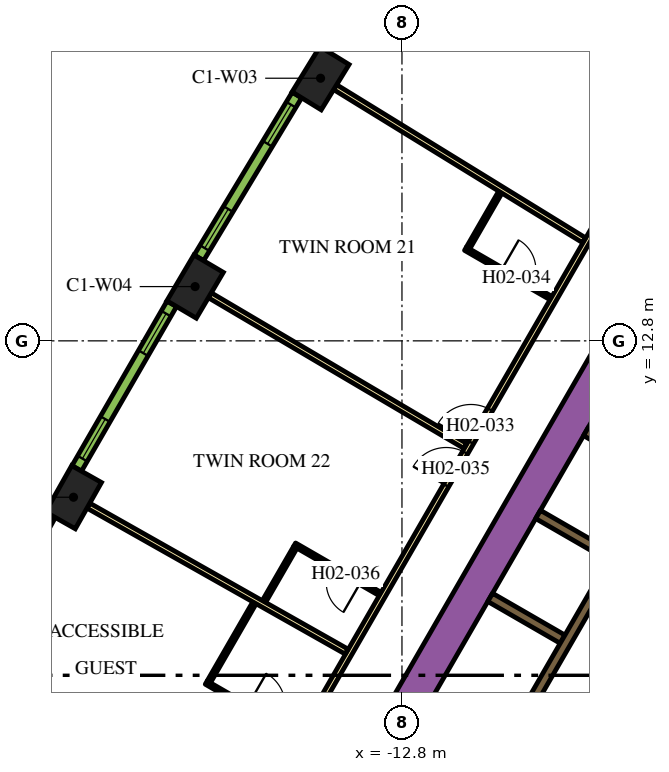
"""IFC4 building model, lengths in metres.
Left out: names, types, materials, properties, quantities, classifications, styles, units other than length and angle.
Written with IfcOpenShell. Run it as: python <this file> out.ifc"""

import sys

from ifc_helpers import new_model, si_unit, direction, frame, frame_2d, origin, origin_2d, place, context, subcontext, project, spatial, rectangle, extrude, element, fill, save


model = new_model("IFC4")
c1 = context("Model", 3, precision=1e-05, world=origin(), true_north=direction((0.0, 1.0)))
c2 = subcontext(c1, "Body", "Model", "MODEL_VIEW")
j1 = project(units=[si_unit("LENGTHUNIT", "METRE"), si_unit("PLANEANGLEUNIT", "RADIAN")], contexts=[c1])
p1 = place(None, origin())
s1 = spatial("IfcSite", under=j1, at=p1, CompositionType="ELEMENT")
p2 = place(p1, origin())
s2 = spatial("IfcBuilding", under=s1, at=p2, CompositionType="ELEMENT")
p3 = place(p2, frame((0.0, 0.0, 39.3)))
s3 = spatial("IfcBuildingStorey", under=s2, at=p3, CompositionType="ELEMENT", Elevation=39.3)
for number, where, z_axis, x_axis in (
    (1, (-14.942, 19.71, 0.0), (0.0, 0.0, 1.0), (-0.524, -0.852, 0.0)),
    (2, (-18.243, 14.228, 0.0), (0.0, 0.0, 1.0), (-0.508, -0.861, 0.0)),
    (3, (-21.443, 8.685, 0.0), (0.0, 0.0, 1.0), (-0.492, -0.871, 0.0)),
):
    element("IfcColumn", number, at=place(p3, frame(where, z_axis=z_axis, x_axis=x_axis)), inside=s3, PredefinedType="COLUMN", context=c2, shape_type="SweptSolid", body=[
        extrude(rectangle(XDim=1.4, YDim=0.9, at=origin_2d()), origin(), (0.0, 0.0, 1.0), 3.9),
    ])
p4 = place(p3, frame((-15.36, -1.503, 0.0), z_axis=(0.0, 0.0, 1.0), x_axis=(0.50000389221, 0.866023156604, 0.0)))
e4 = element("IfcWall", 4, at=p4, inside=s3, PredefinedType="SOLIDWALL", context=c2, shape_type="SweptSolid", body=[
    extrude(rectangle(XDim=21.0, YDim=0.9, at=frame_2d((10.5, 0.0))), origin(), (0.0, 0.0, 1.0), 3.9),
])
p5 = place(p3, frame((-8.06, -1.311, 0.0), z_axis=(0.0, 0.0, 1.0), x_axis=(0.50000273126, 0.866023826885, 0.0)))
e5 = element("IfcWall", 5, at=p5, inside=s3, PredefinedType="SOLIDWALL", context=c2, shape_type="SweptSolid", body=[
    extrude(rectangle(XDim=10.33, YDim=0.25, at=frame_2d((5.165, 0.0))), origin(), (0.0, 0.0, 1.0), 3.9),
])
for number, where, z_axis, x_axis in (
    (6, (-8.574, 4.95, 0.0), (0.0, 0.0, 1.0), (-0.866, 0.5, 0.0)),
    (7, (-7.314, 7.132, 0.0), (0.0, 0.0, 1.0), (-0.866, 0.5, 0.0)),
):
    element("IfcWall", number, at=place(p3, frame(where, z_axis=z_axis, x_axis=x_axis)), inside=s3, PredefinedType="SOLIDWALL", context=c2, shape_type="SweptSolid", body=[
        extrude(rectangle(XDim=2.2, YDim=0.25, at=frame_2d((1.1, 0.0))), origin(), (0.0, 0.0, 1.0), 3.9),
    ])
p6 = place(p3, frame((-7.959, 10.415, 0.0), z_axis=(0.0, 0.0, 1.0), x_axis=(0.866020958405, -0.500007699544, 0.0)))
e8 = element("IfcWall", 8, at=p6, inside=s3, PredefinedType="SOLIDWALL", context=c2, shape_type="SweptSolid", body=[
    extrude(rectangle(XDim=4.1, YDim=0.25, at=frame_2d((2.05, 0.0))), origin(), (0.0, 0.0, 1.0), 3.9),
])
p7 = place(p3, frame((-6.008, 9.144, 0.0), z_axis=(0.0, 0.0, 1.0), x_axis=(-0.500006956611, -0.866021387346, 0.0)))
e9 = element("IfcWall", 9, at=p7, inside=s3, PredefinedType="SOLIDWALL", context=c2, shape_type="SweptSolid", body=[
    extrude(rectangle(XDim=9.83, YDim=0.25, at=frame_2d((4.915, 0.0))), origin(), (0.0, 0.0, 1.0), 3.9),
])
p8 = place(p7, frame((6.985, 0.0, 0.0)))
e10 = element("IfcOpeningElement", 10, at=p8, cuts=e9, PredefinedType="OPENING", context=c2, shape_type="SweptSolid", body=[
    extrude(rectangle(XDim=0.9, YDim=2.1, at=frame_2d((0.45, 1.05))), frame((0.0, 0.135, 0.0), z_axis=(0.0, -1.0, 0.0), x_axis=(1.0, 0.0, 0.0)), (0.0, 0.0, 1.0), 0.27),
])
p9 = place(p3, frame((-19.081, -3.9, 0.0), z_axis=(0.0, 0.0, 1.0), x_axis=(0.499998313975, 0.866026377209, 0.0)))
e11 = element("IfcWall", 11, at=p9, inside=s3, PredefinedType="PARTITIONING", context=c2, shape_type="SweptSolid", body=[
    extrude(rectangle(XDim=25.766, YDim=0.15, at=frame_2d((12.883, 0.0))), origin(), (0.0, 0.0, 1.0), 2.75),
])
p10 = place(p9, frame((16.196, 0.0, 0.0)))
e12 = element("IfcOpeningElement", 12, at=p10, cuts=e11, PredefinedType="OPENING", context=c2, shape_type="SweptSolid", body=[
    extrude(rectangle(XDim=1.0, YDim=2.1, at=frame_2d((0.5, 1.05))), frame((0.0, 0.085, 0.0), z_axis=(0.0, -1.0, 0.0), x_axis=(1.0, 0.0, 0.0)), (0.0, 0.0, 1.0), 0.17),
])
p11 = place(p9, frame((14.889, 0.0, 0.0)))
e13 = element("IfcOpeningElement", 13, at=p11, cuts=e11, PredefinedType="OPENING", context=c2, shape_type="SweptSolid", body=[
    extrude(rectangle(XDim=1.0, YDim=2.1, at=frame_2d((0.5, 1.05))), frame((0.0, 0.085, 0.0), z_axis=(0.0, -1.0, 0.0), x_axis=(1.0, 0.0, 0.0)), (0.0, 0.0, 1.0), 0.17),
])
p12 = place(p9, frame((3.698, 0.0, 0.0)))
e14 = element("IfcOpeningElement", 14, at=p12, cuts=e11, PredefinedType="OPENING", context=c2, shape_type="SweptSolid", body=[
    extrude(rectangle(XDim=1.1, YDim=2.1, at=frame_2d((0.55, 1.05))), frame((0.0, 0.085, 0.0), z_axis=(0.0, -1.0, 0.0), x_axis=(1.0, 0.0, 0.0)), (0.0, 0.0, 1.0), 0.17),
])
p13 = place(p9, frame((2.392, 0.0, 0.0)))
e15 = element("IfcOpeningElement", 15, at=p13, cuts=e11, PredefinedType="OPENING", context=c2, shape_type="SweptSolid", body=[
    extrude(rectangle(XDim=1.0, YDim=2.1, at=frame_2d((0.5, 1.05))), frame((0.0, 0.085, 0.0), z_axis=(0.0, -1.0, 0.0), x_axis=(1.0, 0.0, 0.0)), (0.0, 0.0, 1.0), 0.17),
])
p14 = place(p3, frame((-21.052, 8.464, 0.0), z_axis=(0.0, 0.0, 1.0), x_axis=(0.87059371954, -0.492002617368, 0.0)))
e16 = element("IfcWall", 16, at=p14, inside=s3, PredefinedType="PARTITIONING", context=c2, shape_type="SweptSolid", body=[
    extrude(rectangle(XDim=7.803, YDim=0.15, at=frame_2d((3.902, 0.0))), origin(), (0.0, 0.0, 1.0), 2.75),
])
p15 = place(p3, frame((-17.856, 13.999, 0.0), z_axis=(0.0, 0.0, 1.0), x_axis=(0.861371519381, -0.507975497047, 0.0)))
e17 = element("IfcWall", 17, at=p15, inside=s3, PredefinedType="PARTITIONING", context=c2, shape_type="SweptSolid", body=[
    extrude(rectangle(XDim=7.804, YDim=0.15, at=frame_2d((3.902, 0.0))), origin(), (0.0, 0.0, 1.0), 2.75),
])
p16 = place(p3, frame((-14.558, 19.475, 0.0), z_axis=(0.0, 0.0, 1.0), x_axis=(0.851829455142, -0.523819223925, 0.0)))
e18 = element("IfcWall", 18, at=p16, inside=s3, PredefinedType="PARTITIONING", context=c2, shape_type="SweptSolid", body=[
    extrude(rectangle(XDim=7.688, YDim=0.15, at=frame_2d((3.844, 0.0))), origin(), (0.0, 0.0, 1.0), 2.75),
])
p17 = place(p3, frame((-11.129, 15.224, 0.0), z_axis=(0.0, 0.0, 1.0), x_axis=(0.866021400173, -0.500006934395, 0.0)))
e19 = element("IfcWall", 19, at=p17, inside=s3, PredefinedType="PARTITIONING", context=c2, shape_type="SweptSolid", body=[
    extrude(rectangle(XDim=2.6, YDim=0.1, at=frame_2d((1.3, 0.0))), origin(), (0.0, 0.0, 1.0), 2.75),
])
p18 = place(p17, frame((1.1, 0.0, 0.0)))
e20 = element("IfcOpeningElement", 20, at=p18, cuts=e19, PredefinedType="OPENING", context=c2, shape_type="SweptSolid", body=[
    extrude(rectangle(XDim=0.9, YDim=2.1, at=frame_2d((0.45, 1.05))), frame((0.0, 0.06, 0.0), z_axis=(0.0, -1.0, 0.0), x_axis=(1.0, 0.0, 0.0)), (0.0, 0.0, 1.0), 0.12),
])
p19 = place(p3, frame((-11.061, 15.242, 0.0), z_axis=(0.0, 0.0, 1.0), x_axis=(0.499976720371, 0.866038843867, 0.0)))
e21 = element("IfcWall", 21, at=p19, inside=s3, PredefinedType="PARTITIONING", context=c2, shape_type="SweptSolid", body=[
    extrude(rectangle(XDim=1.69, YDim=0.1, at=frame_2d((0.845, 0.0))), origin(), (0.0, 0.0, 1.0), 2.75),
])
p20 = place(p3, frame((-13.373, 6.138, 0.0), z_axis=(0.0, 0.0, 1.0), x_axis=(-0.866062058628, 0.499936506574, 0.0)))
e22 = element("IfcWall", 22, at=p20, inside=s3, PredefinedType="PARTITIONING", context=c2, shape_type="SweptSolid", body=[
    extrude(rectangle(XDim=2.6, YDim=0.1, at=frame_2d((1.3, 0.0))), origin(), (0.0, 0.0, 1.0), 2.75),
])
p21 = place(p20, frame((0.6, 0.0, 0.0)))
e23 = element("IfcOpeningElement", 23, at=p21, cuts=e22, PredefinedType="OPENING", context=c2, shape_type="SweptSolid", body=[
    extrude(rectangle(XDim=0.9, YDim=2.1, at=frame_2d((0.45, 1.05))), frame((0.0, 0.06, 0.0), z_axis=(0.0, -1.0, 0.0), x_axis=(1.0, 0.0, 0.0)), (0.0, 0.0, 1.0), 0.12),
])
p22 = place(p3, frame((-15.606, 7.37, 0.0), z_axis=(0.0, 0.0, 1.0), x_axis=(-0.499974350878, -0.866040211805, 0.0)))
e24 = element("IfcWall", 24, at=p22, inside=s3, PredefinedType="PARTITIONING", context=c2, shape_type="SweptSolid", body=[
    extrude(rectangle(XDim=1.65, YDim=0.1, at=frame_2d((0.825, 0.0))), origin(), (0.0, 0.0, 1.0), 2.75),
])
p23 = place(p3, frame((-17.951, 3.808, 0.0), z_axis=(0.0, 0.0, 1.0), x_axis=(0.866034573852, -0.49998411664, 0.0)))
e25 = element("IfcWall", 25, at=p23, inside=s3, PredefinedType="PARTITIONING", context=c2, shape_type="SweptSolid", body=[
    extrude(rectangle(XDim=2.8, YDim=0.1, at=frame_2d((1.4, 0.0))), origin(), (0.0, 0.0, 1.0), 2.75),
])
p24 = place(p23, frame((1.25, 0.0, 0.0)))
e26 = element("IfcOpeningElement", 26, at=p24, cuts=e25, PredefinedType="OPENING", context=c2, shape_type="SweptSolid", body=[
    extrude(rectangle(XDim=1.0, YDim=2.1, at=frame_2d((0.5, 1.05))), frame((0.0, 0.06, 0.0), z_axis=(0.0, -1.0, 0.0), x_axis=(1.0, 0.0, 0.0)), (0.0, 0.0, 1.0), 0.12),
])
p25 = place(p3, frame((-17.878, 3.835, 0.0), z_axis=(0.0, 0.0, 1.0), x_axis=(0.500061428766, 0.865989934965, 0.0)))
e27 = element("IfcWall", 27, at=p25, inside=s3, PredefinedType="PARTITIONING", context=c2, shape_type="SweptSolid", body=[
    extrude(rectangle(XDim=2.39, YDim=0.1, at=frame_2d((1.195, 0.0))), origin(), (0.0, 0.0, 1.0), 2.75),
])
p26 = place(p3, frame((-12.17, 24.699, 0.0), z_axis=(0.0, 0.0, 1.0), x_axis=(-0.531688286542, -0.846940119462, 0.0)))
e28 = element("IfcWall", 28, at=p26, inside=s3, PredefinedType="SOLIDWALL", context=c2, shape_type="SweptSolid", body=[
    extrude(rectangle(XDim=4.998, YDim=0.29, at=frame_2d((2.499, 0.0))), origin(), (0.0, 0.0, 1.0), 3.65),
])
p27 = place(p26, frame((0.297, 0.0, 0.9)))
e29 = element("IfcOpeningElement", 29, at=p27, cuts=e28, PredefinedType="OPENING", context=c2, shape_type="SweptSolid", body=[
    extrude(rectangle(XDim=1.2, YDim=2.15, at=frame_2d((0.6, 1.075))), frame((0.0, 0.155, 0.0), z_axis=(0.0, -1.0, 0.0), x_axis=(1.0, 0.0, 0.0)), (0.0, 0.0, 1.0), 0.31),
])
p28 = place(p26, frame((3.501, 0.0, 0.9)))
e30 = element("IfcOpeningElement", 30, at=p28, cuts=e28, PredefinedType="OPENING", context=c2, shape_type="SweptSolid", body=[
    extrude(rectangle(XDim=1.2, YDim=2.15, at=frame_2d((0.6, 1.075))), frame((0.0, 0.155, 0.0), z_axis=(0.0, -1.0, 0.0), x_axis=(1.0, 0.0, 0.0)), (0.0, 0.0, 1.0), 0.31),
])
p29 = place(p3, frame((-15.564, 19.267, 0.0), z_axis=(0.0, 0.0, 1.0), x_axis=(-0.515938796285, -0.856625448191, 0.0)))
e31 = element("IfcWall", 31, at=p29, inside=s3, PredefinedType="SOLIDWALL", context=c2, shape_type="SweptSolid", body=[
    extrude(rectangle(XDim=4.998, YDim=0.29, at=frame_2d((2.499, 0.0))), origin(), (0.0, 0.0, 1.0), 3.65),
])
p30 = place(p29, frame((0.297, 0.0, 0.9)))
e32 = element("IfcOpeningElement", 32, at=p30, cuts=e31, PredefinedType="OPENING", context=c2, shape_type="SweptSolid", body=[
    extrude(rectangle(XDim=1.2, YDim=2.15, at=frame_2d((0.6, 1.075))), frame((0.0, 0.155, 0.0), z_axis=(0.0, -1.0, 0.0), x_axis=(1.0, 0.0, 0.0)), (0.0, 0.0, 1.0), 0.31),
])
p31 = place(p29, frame((3.501, 0.0, 0.9)))
e33 = element("IfcOpeningElement", 33, at=p31, cuts=e31, PredefinedType="OPENING", context=c2, shape_type="SweptSolid", body=[
    extrude(rectangle(XDim=1.2, YDim=2.15, at=frame_2d((0.6, 1.075))), frame((0.0, 0.155, 0.0), z_axis=(0.0, -1.0, 0.0), x_axis=(1.0, 0.0, 0.0)), (0.0, 0.0, 1.0), 0.31),
])
p32 = place(p3, frame((-18.858, 13.773, 0.0), z_axis=(0.0, 0.0, 1.0), x_axis=(-0.50002123722, -0.866013142123, 0.0)))
e34 = element("IfcWall", 34, at=p32, inside=s3, PredefinedType="SOLIDWALL", context=c2, shape_type="SweptSolid", body=[
    extrude(rectangle(XDim=4.998, YDim=0.29, at=frame_2d((2.499, 0.0))), origin(), (0.0, 0.0, 1.0), 3.65),
])
p33 = place(p32, frame((0.297, 0.0, 0.9)))
e35 = element("IfcOpeningElement", 35, at=p33, cuts=e34, PredefinedType="OPENING", context=c2, shape_type="SweptSolid", body=[
    extrude(rectangle(XDim=1.2, YDim=2.15, at=frame_2d((0.6, 1.075))), frame((0.0, 0.155, 0.0), z_axis=(0.0, -1.0, 0.0), x_axis=(1.0, 0.0, 0.0)), (0.0, 0.0, 1.0), 0.31),
])
p34 = place(p32, frame((3.501, 0.0, 0.9)))
e36 = element("IfcOpeningElement", 36, at=p34, cuts=e34, PredefinedType="OPENING", context=c2, shape_type="SweptSolid", body=[
    extrude(rectangle(XDim=1.2, YDim=2.15, at=frame_2d((0.6, 1.075))), frame((0.0, 0.155, 0.0), z_axis=(0.0, -1.0, 0.0), x_axis=(1.0, 0.0, 0.0)), (0.0, 0.0, 1.0), 0.31),
])
p35 = place(p3, frame((-22.05, 8.22, 0.0), z_axis=(0.0, 0.0, 1.0), x_axis=(-0.483912572871, -0.875116347589, 0.0)))
e37 = element("IfcWall", 37, at=p35, inside=s3, PredefinedType="SOLIDWALL", context=c2, shape_type="SweptSolid", body=[
    extrude(rectangle(XDim=4.998, YDim=0.29, at=frame_2d((2.499, 0.0))), origin(), (0.0, 0.0, 1.0), 3.65),
])
p36 = place(p35, frame((0.297, 0.0, 0.9)))
e38 = element("IfcOpeningElement", 38, at=p36, cuts=e37, PredefinedType="OPENING", context=c2, shape_type="SweptSolid", body=[
    extrude(rectangle(XDim=1.2, YDim=2.15, at=frame_2d((0.6, 1.075))), frame((0.0, 0.155, 0.0), z_axis=(0.0, -1.0, 0.0), x_axis=(1.0, 0.0, 0.0)), (0.0, 0.0, 1.0), 0.31),
])
p37 = place(p35, frame((3.501, 0.0, 0.9)))
e39 = element("IfcOpeningElement", 39, at=p37, cuts=e37, PredefinedType="OPENING", context=c2, shape_type="SweptSolid", body=[
    extrude(rectangle(XDim=1.2, YDim=2.15, at=frame_2d((0.6, 1.075))), frame((0.0, 0.155, 0.0), z_axis=(0.0, -1.0, 0.0), x_axis=(1.0, 0.0, 0.0)), (0.0, 0.0, 1.0), 0.31),
])
p38 = place(p10, origin())
e40 = element("IfcDoor", 40, at=p38, inside=s3, OperationType="SINGLE_SWING_LEFT", PredefinedType="DOOR", context=c2, shape_type="SweptSolid", body=[
    extrude(rectangle(XDim=1.0, YDim=2.1, at=frame_2d((0.5, 1.05))), frame((0.0, 0.025, 0.0), z_axis=(0.0, -1.0, 0.0), x_axis=(1.0, 0.0, 0.0)), (0.0, 0.0, 1.0), 0.05),
])
fill(e12, e40)
p39 = place(p18, origin())
e41 = element("IfcDoor", 41, at=p39, inside=s3, OperationType="SINGLE_SWING_RIGHT", PredefinedType="DOOR", context=c2, shape_type="SweptSolid", body=[
    extrude(rectangle(XDim=0.9, YDim=2.1, at=frame_2d((0.45, 1.05))), frame((0.0, 0.025, 0.0), z_axis=(0.0, -1.0, 0.0), x_axis=(1.0, 0.0, 0.0)), (0.0, 0.0, 1.0), 0.05),
])
fill(e20, e41)
p40 = place(p11, origin())
e42 = element("IfcDoor", 42, at=p40, inside=s3, OperationType="SINGLE_SWING_RIGHT", PredefinedType="DOOR", context=c2, shape_type="SweptSolid", body=[
    extrude(rectangle(XDim=1.0, YDim=2.1, at=frame_2d((0.5, 1.05))), frame((0.0, 0.025, 0.0), z_axis=(0.0, -1.0, 0.0), x_axis=(1.0, 0.0, 0.0)), (0.0, 0.0, 1.0), 0.05),
])
fill(e13, e42)
p41 = place(p21, origin())
e43 = element("IfcDoor", 43, at=p41, inside=s3, OperationType="SINGLE_SWING_LEFT", PredefinedType="DOOR", context=c2, shape_type="SweptSolid", body=[
    extrude(rectangle(XDim=0.9, YDim=2.1, at=frame_2d((0.45, 1.05))), frame((0.0, 0.025, 0.0), z_axis=(0.0, -1.0, 0.0), x_axis=(1.0, 0.0, 0.0)), (0.0, 0.0, 1.0), 0.05),
])
fill(e23, e43)
p42 = place(p30, origin())
e44 = element("IfcWindow", 44, at=p42, inside=s3, PartitioningType="DOUBLE_PANEL_VERTICAL", PredefinedType="WINDOW", context=c2, shape_type="SweptSolid", body=[
    extrude(rectangle(XDim=1.2, YDim=2.15, at=frame_2d((0.6, 1.075))), frame((0.0, 0.015, 0.0), z_axis=(0.0, -1.0, 0.0), x_axis=(1.0, 0.0, 0.0)), (0.0, 0.0, 1.0), 0.06),
])
fill(e32, e44)
p43 = place(p31, origin())
e45 = element("IfcWindow", 45, at=p43, inside=s3, PartitioningType="DOUBLE_PANEL_VERTICAL", PredefinedType="WINDOW", context=c2, shape_type="SweptSolid", body=[
    extrude(rectangle(XDim=1.2, YDim=2.15, at=frame_2d((0.6, 1.075))), frame((0.0, 0.015, 0.0), z_axis=(0.0, -1.0, 0.0), x_axis=(1.0, 0.0, 0.0)), (0.0, 0.0, 1.0), 0.06),
])
fill(e33, e45)
p44 = place(p33, origin())
e46 = element("IfcWindow", 46, at=p44, inside=s3, PartitioningType="DOUBLE_PANEL_VERTICAL", PredefinedType="WINDOW", context=c2, shape_type="SweptSolid", body=[
    extrude(rectangle(XDim=1.2, YDim=2.15, at=frame_2d((0.6, 1.075))), frame((0.0, 0.015, 0.0), z_axis=(0.0, -1.0, 0.0), x_axis=(1.0, 0.0, 0.0)), (0.0, 0.0, 1.0), 0.06),
])
fill(e35, e46)
p45 = place(p34, origin())
e47 = element("IfcWindow", 47, at=p45, inside=s3, PartitioningType="DOUBLE_PANEL_VERTICAL", PredefinedType="WINDOW", context=c2, shape_type="SweptSolid", body=[
    extrude(rectangle(XDim=1.2, YDim=2.15, at=frame_2d((0.6, 1.075))), frame((0.0, 0.015, 0.0), z_axis=(0.0, -1.0, 0.0), x_axis=(1.0, 0.0, 0.0)), (0.0, 0.0, 1.0), 0.06),
])
fill(e36, e47)
save(model, sys.argv[1])
